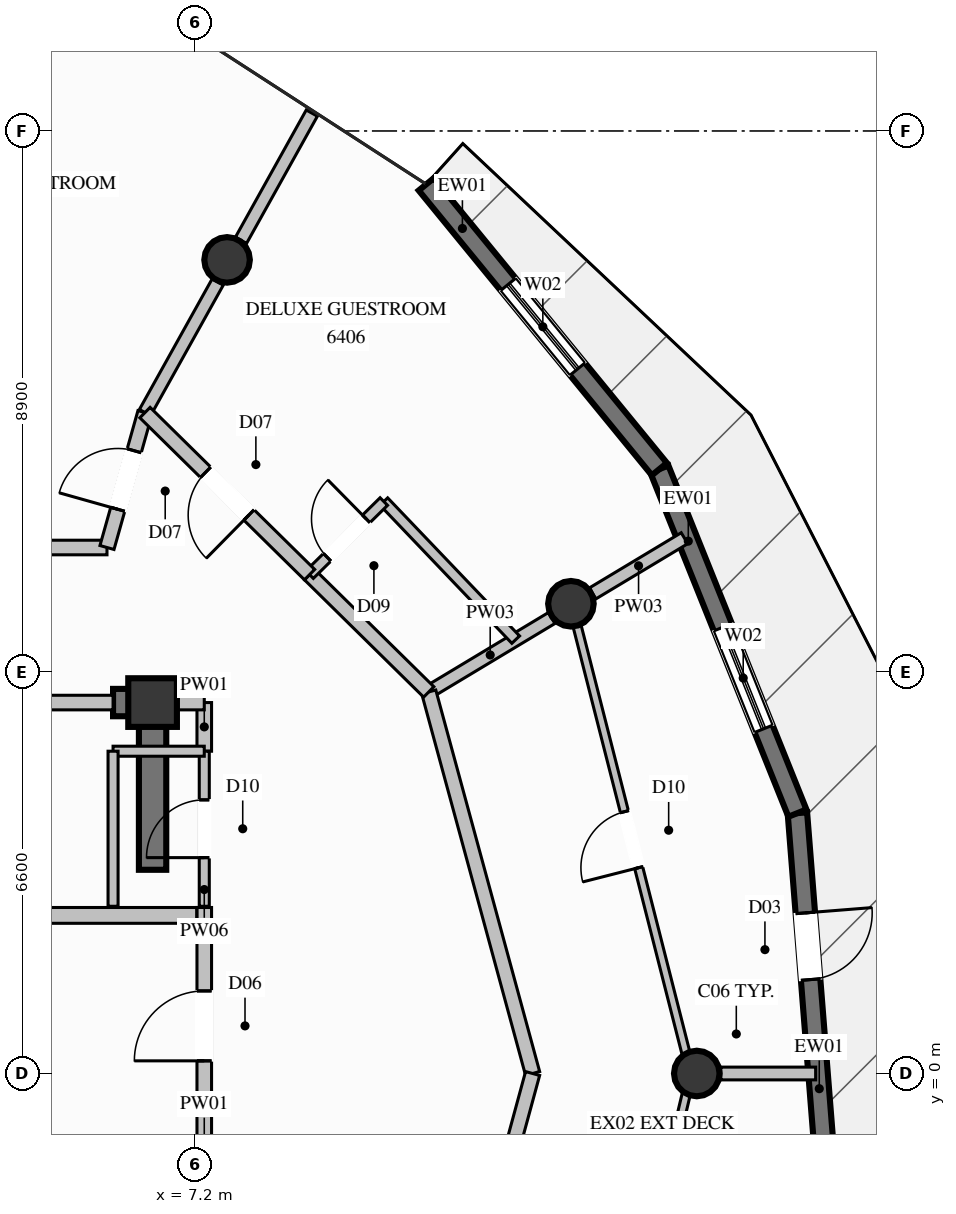
"""IFC4 building model, lengths in metres.
Left out: names, types, materials, properties, quantities, classifications, styles, units other than length and angle.
Written with IfcOpenShell. Run it as: python <this file> out.ifc"""

import sys

from ifc_helpers import new_model, si_unit, direction, frame, frame_2d, origin, origin_2d, place, context, subcontext, project, spatial, rectangle, circle, extrude, element, fill, save


model = new_model("IFC4")
c1 = context("Model", 3, precision=1e-05, world=origin(), true_north=direction((0.0, 1.0)))
c2 = subcontext(c1, "Body", "Model", "MODEL_VIEW")
j1 = project(units=[si_unit("LENGTHUNIT", "METRE"), si_unit("PLANEANGLEUNIT", "RADIAN")], contexts=[c1])
p1 = place(None, origin())
s1 = spatial("IfcSite", under=j1, at=p1, CompositionType="ELEMENT")
p2 = place(p1, origin())
s2 = spatial("IfcBuilding", under=s1, at=p2, CompositionType="ELEMENT")
p3 = place(p2, frame((0.0, 0.0, 239.2)))
s3 = spatial("IfcBuildingStorey", under=s2, at=p3, CompositionType="ELEMENT", Elevation=239.2)
p4 = place(p3, frame((6.5, 6.1, 0.0), z_axis=(0.0, 0.0, 1.0), x_axis=(1.0, 0.0, 0.0)))
e1 = element("IfcColumn", 1, at=p4, inside=s3, PredefinedType="COLUMN", context=c2, shape_type="SweptSolid", body=[
    extrude(rectangle(XDim=0.8, YDim=0.8, at=origin_2d()), origin(), (0.0, 0.0, 1.0), 3.8),
])
p5 = place(p3, frame((5.85, 6.1, 0.0), z_axis=(0.0, 0.0, 1.0), x_axis=(1.0, 0.0, 0.0)))
e2 = element("IfcWall", 2, at=p5, inside=s3, PredefinedType="SHEAR", context=c2, shape_type="SweptSolid", body=[
    extrude(rectangle(XDim=0.425, YDim=0.45, at=frame_2d((0.212, 0.0))), origin(), (0.0, 0.0, 1.0), 3.8),
])
p6 = place(p3, frame((6.5, 3.35, 0.0), z_axis=(0.0, 0.0, 1.0), x_axis=(0.0, 1.0, 0.0)))
e3 = element("IfcWall", 3, at=p6, inside=s3, PredefinedType="SHEAR", context=c2, shape_type="SweptSolid", body=[
    extrude(rectangle(XDim=2.975, YDim=0.45, at=frame_2d((1.487, 0.0))), origin(), (0.0, 0.0, 1.0), 3.8),
])
for number, where, z_axis, x_axis in (
    (4, (15.45, 0.0, 0.0), (0.0, 0.0, 1.0), (1.0, 0.0, 0.0)),
    (5, (13.38, 7.725, 0.0), (0.0, 0.0, 1.0), (1.0, 0.0, 0.0)),
    (6, (7.725, 13.38, 0.0), (0.0, 0.0, 1.0), (1.0, 0.0, 0.0)),
):
    element("IfcColumn", number, at=place(p3, frame(where, z_axis=z_axis, x_axis=x_axis)), inside=s3, PredefinedType="COLUMN", context=c2, shape_type="SweptSolid", body=[
        extrude(circle(Radius=0.375, at=origin_2d()), origin(), (0.0, 0.0, 1.0), 3.8),
    ])
p7 = place(p3, frame((17.105, 4.282, 0.0), z_axis=(0.0, 0.0, 1.0), x_axis=(0.079057550351, -0.996870053584, 0.0)))
e7 = element("IfcWall", 7, at=p7, inside=s3, PredefinedType="SOLIDWALL", context=c2, shape_type="SweptSolid", body=[
    extrude(rectangle(XDim=6.096, YDim=0.32, at=frame_2d((3.048, 0.0))), origin(), (0.0, 0.0, 1.0), 3.57),
])
p8 = place(p7, frame((1.646, 0.0, 0.0)))
e8 = element("IfcOpeningElement", 8, at=p8, cuts=e7, PredefinedType="OPENING", context=c2, shape_type="SweptSolid", body=[
    extrude(rectangle(XDim=1.1, YDim=2.2, at=frame_2d((0.55, 1.1))), frame((0.0, 0.17, 0.0), z_axis=(0.0, -1.0, 0.0), x_axis=(1.0, 0.0, 0.0)), (0.0, 0.0, 1.0), 0.34),
])
p9 = place(p3, frame((14.835, 9.939, 0.0), z_axis=(0.0, 0.0, 1.0), x_axis=(0.372412492589, -0.928067311871, 0.0)))
e9 = element("IfcWall", 9, at=p9, inside=s3, PredefinedType="SOLIDWALL", context=c2, shape_type="SweptSolid", body=[
    extrude(rectangle(XDim=6.095, YDim=0.32, at=frame_2d((3.048, 0.0))), origin(), (0.0, 0.0, 1.0), 3.57),
])
p10 = place(p9, frame((2.802, 0.0, 0.35)))
e10 = element("IfcOpeningElement", 10, at=p10, cuts=e9, PredefinedType="OPENING", context=c2, shape_type="SweptSolid", body=[
    extrude(rectangle(XDim=1.8, YDim=2.6, at=frame_2d((0.9, 1.3))), frame((0.0, 0.17, 0.0), z_axis=(0.0, -1.0, 0.0), x_axis=(1.0, 0.0, 0.0)), (0.0, 0.0, 1.0), 0.34),
])
p11 = place(p3, frame((11.001, 14.623, 0.0), z_axis=(0.0, 0.0, 1.0), x_axis=(0.633391522875, -0.773831492478, 0.0)))
e11 = element("IfcWall", 11, at=p11, inside=s3, PredefinedType="SOLIDWALL", context=c2, shape_type="SweptSolid", body=[
    extrude(rectangle(XDim=6.053, YDim=0.32, at=frame_2d((3.027, 0.0))), origin(), (0.0, 0.0, 1.0), 3.57),
])
p12 = place(p11, frame((2.127, 0.0, 0.35)))
e12 = element("IfcOpeningElement", 12, at=p12, cuts=e11, PredefinedType="OPENING", context=c2, shape_type="SweptSolid", body=[
    extrude(rectangle(XDim=1.8, YDim=2.6, at=frame_2d((0.9, 1.3))), frame((0.0, 0.17, 0.0), z_axis=(0.0, -1.0, 0.0), x_axis=(1.0, 0.0, 0.0)), (0.0, 0.0, 1.0), 0.34),
])
p13 = place(p3, frame((7.35, -2.34, 0.0), z_axis=(0.0, 0.0, 1.0), x_axis=(0.0, 1.0, 0.0)))
e13 = element("IfcWall", 13, at=p13, inside=s3, PredefinedType="PARTITIONING", context=c2, shape_type="SweptSolid", body=[
    extrude(rectangle(XDim=5.07, YDim=0.24, at=frame_2d((2.535, 0.0))), origin(), (0.0, 0.0, 1.0), 2.655),
])
p14 = place(p13, frame((2.548, 0.0, 0.0)))
e14 = element("IfcOpeningElement", 14, at=p14, cuts=e13, PredefinedType="OPENING", context=c2, shape_type="SweptSolid", body=[
    extrude(rectangle(XDim=1.15, YDim=2.2, at=frame_2d((0.575, 1.1))), frame((0.0, 0.13, 0.0), z_axis=(0.0, -1.0, 0.0), x_axis=(1.0, 0.0, 0.0)), (0.0, 0.0, 1.0), 0.26),
])
p15 = place(p3, frame((4.13, 2.6, 0.0), z_axis=(0.0, 0.0, 1.0), x_axis=(1.0, 0.0, 0.0)))
e15 = element("IfcWall", 15, at=p15, inside=s3, PredefinedType="PARTITIONING", context=c2, shape_type="SweptSolid", body=[
    extrude(rectangle(XDim=3.095, YDim=0.26, at=frame_2d((1.548, 0.0))), origin(), (0.0, 0.0, 1.0), 3.57),
])
p16 = place(p3, frame((-5.75, 8.65, 0.0), z_axis=(0.0, 0.0, 1.0), x_axis=(1.0, 0.0, 0.0)))
e16 = element("IfcWall", 16, at=p16, inside=s3, PredefinedType="PARTITIONING", context=c2, shape_type="SweptSolid", body=[
    extrude(rectangle(XDim=11.5, YDim=0.24, at=frame_2d((5.75, 0.0))), origin(), (0.0, 0.0, 1.0), 3.57),
])
p17 = place(p3, frame((3.0, 6.1, 0.0), z_axis=(0.0, 0.0, 1.0), x_axis=(1.0, 0.0, 0.0)))
e17 = element("IfcWall", 17, at=p17, inside=s3, PredefinedType="PARTITIONING", context=c2, shape_type="SweptSolid", body=[
    extrude(rectangle(XDim=2.85, YDim=0.24, at=frame_2d((1.425, 0.0))), origin(), (0.0, 0.0, 1.0), 2.655),
])
p18 = place(p3, frame((7.35, 5.3, 0.0), z_axis=(0.0, 0.0, 1.0), x_axis=(0.0, 1.0, 0.0)))
e18 = element("IfcWall", 18, at=p18, inside=s3, PredefinedType="PARTITIONING", context=c2, shape_type="SweptSolid", body=[
    extrude(rectangle(XDim=0.8, YDim=0.24, at=frame_2d((0.4, 0.0))), origin(), (0.0, 0.0, 1.0), 2.655),
])
p19 = place(p3, frame((6.5, 6.1, 0.0), z_axis=(0.0, 0.0, 1.0), x_axis=(1.0, 0.0, 0.0)))
e19 = element("IfcWall", 19, at=p19, inside=s3, PredefinedType="PARTITIONING", context=c2, shape_type="SweptSolid", body=[
    extrude(rectangle(XDim=0.85, YDim=0.24, at=frame_2d((0.425, 0.0))), origin(), (0.0, 0.0, 1.0), 3.011),
])
p20 = place(p3, frame((7.35, 2.75, 0.0), z_axis=(0.0, 0.0, 1.0), x_axis=(0.0, 1.0, 0.0)))
e20 = element("IfcWall", 20, at=p20, inside=s3, PredefinedType="PARTITIONING", context=c2, shape_type="SweptSolid", body=[
    extrude(rectangle(XDim=2.55, YDim=0.165, at=frame_2d((1.275, 0.0))), origin(), (0.0, 0.0, 1.0), 3.57),
])
p21 = place(p20, frame((0.8, 0.0, 0.0)))
e21 = element("IfcOpeningElement", 21, at=p21, cuts=e20, PredefinedType="OPENING", context=c2, shape_type="SweptSolid", body=[
    extrude(rectangle(XDim=0.95, YDim=2.1, at=frame_2d((0.475, 1.05))), frame((0.0, 0.093, 0.0), z_axis=(0.0, -1.0, 0.0), x_axis=(1.0, 0.0, 0.0)), (0.0, 0.0, 1.0), 0.185),
])
p22 = place(p3, frame((7.35, 5.3, 0.0), z_axis=(0.0, 0.0, 1.0), x_axis=(-1.0, 0.0, 0.0)))
e22 = element("IfcWall", 22, at=p22, inside=s3, PredefinedType="PARTITIONING", context=c2, shape_type="SweptSolid", body=[
    extrude(rectangle(XDim=1.5, YDim=0.165, at=frame_2d((0.75, 0.0))), origin(), (0.0, 0.0, 1.0), 2.655),
])
p23 = place(p3, frame((5.85, 5.3, 0.0), z_axis=(0.0, 0.0, 1.0), x_axis=(0.0, -1.0, 0.0)))
e23 = element("IfcWall", 23, at=p23, inside=s3, PredefinedType="PARTITIONING", context=c2, shape_type="SweptSolid", body=[
    extrude(rectangle(XDim=2.55, YDim=0.165, at=frame_2d((1.275, 0.0))), origin(), (0.0, 0.0, 1.0), 2.655),
])
p24 = place(p3, frame((11.042, 6.275, 0.0), z_axis=(0.0, 0.0, 1.0), x_axis=(0.857026686246, 0.515272024335, 0.0)))
e24 = element("IfcWall", 24, at=p24, inside=s3, PredefinedType="PARTITIONING", context=c2, shape_type="SweptSolid", body=[
    extrude(rectangle(XDim=2.358, YDim=0.21, at=frame_2d((1.179, 0.0))), origin(), (0.0, 0.0, 1.0), 3.011),
])
p25 = place(p3, frame((13.737, 7.895, 0.0), z_axis=(0.0, 0.0, 1.0), x_axis=(0.857150569961, 0.515065918514, 0.0)))
e25 = element("IfcWall", 25, at=p25, inside=s3, PredefinedType="PARTITIONING", context=c2, shape_type="SweptSolid", body=[
    extrude(rectangle(XDim=1.763, YDim=0.21, at=frame_2d((0.881, 0.0))), origin(), (0.0, 0.0, 1.0), 3.57),
])
p26 = place(p3, frame((6.375, 10.869, 0.0), z_axis=(0.0, 0.0, 1.0), x_axis=(0.486620940413, 0.873613221255, 0.0)))
e26 = element("IfcWall", 26, at=p26, inside=s3, PredefinedType="PARTITIONING", context=c2, shape_type="SweptSolid", body=[
    extrude(rectangle(XDim=2.458, YDim=0.21, at=frame_2d((1.229, 0.0))), origin(), (0.0, 0.0, 1.0), 3.011),
])
p27 = place(p3, frame((7.954, 13.702, 0.0), z_axis=(0.0, 0.0, 1.0), x_axis=(0.486456485885, 0.873704805607, 0.0)))
e27 = element("IfcWall", 27, at=p27, inside=s3, PredefinedType="PARTITIONING", context=c2, shape_type="SweptSolid", body=[
    extrude(rectangle(XDim=2.395, YDim=0.21, at=frame_2d((1.197, 0.0))), origin(), (0.0, 0.0, 1.0), 3.57),
])
p28 = place(p3, frame((5.75, 8.65, 0.0), z_axis=(0.0, 0.0, 1.0), x_axis=(0.271110513922, 0.962548226969, 0.0)))
e28 = element("IfcWall", 28, at=p28, inside=s3, PredefinedType="PARTITIONING", context=c2, shape_type="SweptSolid", body=[
    extrude(rectangle(XDim=2.305, YDim=0.24, at=frame_2d((1.153, 0.0))), origin(), (0.0, 0.0, 1.0), 3.57),
])
p29 = place(p28, frame((0.653, 0.0, 0.0)))
e29 = element("IfcOpeningElement", 29, at=p29, cuts=e28, PredefinedType="OPENING", context=c2, shape_type="SweptSolid", body=[
    extrude(rectangle(XDim=1.0, YDim=2.2, at=frame_2d((0.5, 1.1))), frame((0.0, 0.13, 0.0), z_axis=(0.0, -1.0, 0.0), x_axis=(1.0, 0.0, 0.0)), (0.0, 0.0, 1.0), 0.26),
])
p30 = place(p3, frame((15.845, 0.0, 0.0), z_axis=(0.0, 0.0, 1.0), x_axis=(1.0, 0.0, 0.0)))
e30 = element("IfcWall", 30, at=p30, inside=s3, PredefinedType="PARTITIONING", context=c2, shape_type="SweptSolid", body=[
    extrude(rectangle(XDim=1.56, YDim=0.21, at=frame_2d((0.78, 0.0))), origin(), (0.0, 0.0, 1.0), 3.57),
])
p31 = place(p3, frame((12.75, 0.0, 0.0), z_axis=(0.0, 0.0, 1.0), x_axis=(-0.262640884433, 0.964893655189, 0.0)))
e31 = element("IfcWall", 31, at=p31, inside=s3, PredefinedType="PARTITIONING", context=c2, shape_type="SweptSolid", body=[
    extrude(rectangle(XDim=6.503, YDim=0.24, at=frame_2d((3.251, 0.0))), origin(), (0.0, 0.0, 1.0), 3.57),
])
p32 = place(p3, frame((11.759, -3.64, 0.0), z_axis=(0.0, 0.0, 1.0), x_axis=(0.2626902414, 0.964880219029, 0.0)))
e32 = element("IfcWall", 32, at=p32, inside=s3, PredefinedType="PARTITIONING", context=c2, shape_type="SweptSolid", body=[
    extrude(rectangle(XDim=3.772, YDim=0.24, at=frame_2d((1.886, 0.0))), origin(), (0.0, 0.0, 1.0), 3.57),
])
p33 = place(p32, frame((1.336, 0.0, 0.0)))
e33 = element("IfcOpeningElement", 33, at=p33, cuts=e32, PredefinedType="OPENING", context=c2, shape_type="SweptSolid", body=[
    extrude(rectangle(XDim=1.1, YDim=2.3, at=frame_2d((0.55, 1.15))), frame((0.0, 0.13, 0.0), z_axis=(0.0, -1.0, 0.0), x_axis=(1.0, 0.0, 0.0)), (0.0, 0.0, 1.0), 0.26),
])
p34 = place(p3, frame((13.516, -7.759, 0.0), z_axis=(0.0, 0.0, 1.0), x_axis=(0.230840940032, 0.972991500685, 0.0)))
e34 = element("IfcWall", 34, at=p34, inside=s3, PredefinedType="PARTITIONING", context=c2, shape_type="SweptSolid", body=[
    extrude(rectangle(XDim=7.974, YDim=0.135, at=frame_2d((3.987, 0.0))), origin(), (0.0, 0.0, 1.0), 3.139),
])
p35 = place(p34, frame((3.512, 0.0, 0.0)))
e35 = element("IfcOpeningElement", 35, at=p35, cuts=e34, PredefinedType="OPENING", context=c2, shape_type="SweptSolid", body=[
    extrude(rectangle(XDim=0.95, YDim=2.1, at=frame_2d((0.475, 1.05))), frame((0.0, 0.078, 0.0), z_axis=(0.0, -1.0, 0.0), x_axis=(1.0, 0.0, 0.0)), (0.0, 0.0, 1.0), 0.155),
])
p36 = place(p3, frame((15.357, 0.0, 0.0), z_axis=(0.0, 0.0, 1.0), x_axis=(-0.246948201866, 0.969028681513, 0.0)))
e36 = element("IfcWall", 36, at=p36, inside=s3, PredefinedType="PARTITIONING", context=c2, shape_type="SweptSolid", body=[
    extrude(rectangle(XDim=7.937, YDim=0.135, at=frame_2d((3.968, 0.0))), origin(), (0.0, 0.0, 1.0), 3.139),
])
p37 = place(p36, frame((3.493, 0.0, 0.0)))
e37 = element("IfcOpeningElement", 37, at=p37, cuts=e36, PredefinedType="OPENING", context=c2, shape_type="SweptSolid", body=[
    extrude(rectangle(XDim=0.95, YDim=2.1, at=frame_2d((0.475, 1.05))), frame((0.0, 0.078, 0.0), z_axis=(0.0, -1.0, 0.0), x_axis=(1.0, 0.0, 0.0)), (0.0, 0.0, 1.0), 0.155),
])
p38 = place(p3, frame((11.042, 6.275, 0.0), z_axis=(0.0, 0.0, 1.0), x_axis=(-0.712677423321, 0.701491903224, 0.0)))
e38 = element("IfcWall", 38, at=p38, inside=s3, PredefinedType="PARTITIONING", context=c2, shape_type="SweptSolid", body=[
    extrude(rectangle(XDim=2.75, YDim=0.24, at=frame_2d((1.375, 0.0))), origin(), (0.0, 0.0, 1.0), 3.57),
])
p39 = place(p3, frame((12.472, 7.135, 0.0), z_axis=(0.0, 0.0, 1.0), x_axis=(-0.690671718567, 0.723168429324, 0.0)))
e39 = element("IfcWall", 39, at=p39, inside=s3, PredefinedType="PLUMBINGWALL", context=c2, shape_type="SweptSolid", body=[
    extrude(rectangle(XDim=3.14, YDim=0.175, at=frame_2d((1.57, 0.0))), origin(), (0.0, 0.0, 1.0), 3.57),
])
p40 = place(p3, frame((9.082, 8.204, 0.0), z_axis=(0.0, 0.0, 1.0), x_axis=(0.712642440828, 0.701527441751, 0.0)))
e40 = element("IfcWall", 40, at=p40, inside=s3, PredefinedType="PLUMBINGWALL", context=c2, shape_type="SweptSolid", body=[
    extrude(rectangle(XDim=1.713, YDim=0.175, at=frame_2d((0.857, 0.0))), origin(), (0.0, 0.0, 1.0), 3.57),
])
p41 = place(p40, frame((0.407, 0.0, 0.0)))
e41 = element("IfcOpeningElement", 41, at=p41, cuts=e40, PredefinedType="OPENING", context=c2, shape_type="SweptSolid", body=[
    extrude(rectangle(XDim=0.9, YDim=2.1, at=frame_2d((0.45, 1.05))), frame((0.0, 0.098, 0.0), z_axis=(0.0, -1.0, 0.0), x_axis=(1.0, 0.0, 0.0)), (0.0, 0.0, 1.0), 0.195),
])
p42 = place(p3, frame((9.082, 8.204, 0.0), z_axis=(0.0, 0.0, 1.0), x_axis=(-0.712644426178, 0.70152542494, 0.0)))
e42 = element("IfcWall", 42, at=p42, inside=s3, PredefinedType="PARTITIONING", context=c2, shape_type="SweptSolid", body=[
    extrude(rectangle(XDim=3.799, YDim=0.24, at=frame_2d((1.899, 0.0))), origin(), (0.0, 0.0, 1.0), 3.57),
])
p43 = place(p42, frame((1.399, 0.0, 0.0)))
e43 = element("IfcOpeningElement", 43, at=p43, cuts=e42, PredefinedType="OPENING", context=c2, shape_type="SweptSolid", body=[
    extrude(rectangle(XDim=1.0, YDim=2.2, at=frame_2d((0.5, 1.1))), frame((0.0, 0.13, 0.0), z_axis=(0.0, -1.0, 0.0), x_axis=(1.0, 0.0, 0.0)), (0.0, 0.0, 1.0), 0.26),
])
p44 = place(p8, origin())
e44 = element("IfcDoor", 44, at=p44, inside=s3, OperationType="SINGLE_SWING_LEFT", PredefinedType="DOOR", context=c2, shape_type="SweptSolid", body=[
    extrude(rectangle(XDim=1.1, YDim=2.2, at=frame_2d((0.55, 1.1))), frame((0.0, 0.025, 0.0), z_axis=(0.0, -1.0, 0.0), x_axis=(1.0, 0.0, 0.0)), (0.0, 0.0, 1.0), 0.05),
])
fill(e8, e44)
p45 = place(p10, origin())
e45 = element("IfcWindow", 45, at=p45, inside=s3, PartitioningType="SINGLE_PANEL", PredefinedType="WINDOW", context=c2, shape_type="SweptSolid", body=[
    extrude(rectangle(XDim=1.8, YDim=2.6, at=frame_2d((0.9, 1.3))), frame((0.0, 0.03, 0.0), z_axis=(0.0, -1.0, 0.0), x_axis=(1.0, 0.0, 0.0)), (0.0, 0.0, 1.0), 0.06),
])
fill(e10, e45)
p46 = place(p12, origin())
e46 = element("IfcWindow", 46, at=p46, inside=s3, PartitioningType="SINGLE_PANEL", PredefinedType="WINDOW", context=c2, shape_type="SweptSolid", body=[
    extrude(rectangle(XDim=1.8, YDim=2.6, at=frame_2d((0.9, 1.3))), frame((0.0, 0.03, 0.0), z_axis=(0.0, -1.0, 0.0), x_axis=(1.0, 0.0, 0.0)), (0.0, 0.0, 1.0), 0.06),
])
fill(e12, e46)
p47 = place(p14, origin())
e47 = element("IfcDoor", 47, at=p47, inside=s3, OperationType="SINGLE_SWING_LEFT", PredefinedType="DOOR", context=c2, shape_type="SweptSolid", body=[
    extrude(rectangle(XDim=1.15, YDim=2.2, at=frame_2d((0.575, 1.1))), frame((0.0, 0.025, 0.0), z_axis=(0.0, -1.0, 0.0), x_axis=(1.0, 0.0, 0.0)), (0.0, 0.0, 1.0), 0.05),
])
fill(e14, e47)
p48 = place(p21, origin())
e48 = element("IfcDoor", 48, at=p48, inside=s3, OperationType="SINGLE_SWING_LEFT", PredefinedType="DOOR", context=c2, shape_type="SweptSolid", body=[
    extrude(rectangle(XDim=0.95, YDim=2.1, at=frame_2d((0.475, 1.05))), frame((0.0, 0.025, 0.0), z_axis=(0.0, -1.0, 0.0), x_axis=(1.0, 0.0, 0.0)), (0.0, 0.0, 1.0), 0.05),
])
fill(e21, e48)
p49 = place(p29, origin())
e49 = element("IfcDoor", 49, at=p49, inside=s3, OperationType="SINGLE_SWING_LEFT", PredefinedType="DOOR", context=c2, shape_type="SweptSolid", body=[
    extrude(rectangle(XDim=1.0, YDim=2.2, at=frame_2d((0.5, 1.1))), frame((0.0, 0.025, 0.0), z_axis=(0.0, -1.0, 0.0), x_axis=(1.0, 0.0, 0.0)), (0.0, 0.0, 1.0), 0.05),
])
fill(e29, e49)
p50 = place(p37, origin())
e50 = element("IfcDoor", 50, at=p50, inside=s3, OperationType="SINGLE_SWING_LEFT", PredefinedType="DOOR", context=c2, shape_type="SweptSolid", body=[
    extrude(rectangle(XDim=0.95, YDim=2.1, at=frame_2d((0.475, 1.05))), frame((0.0, 0.025, 0.0), z_axis=(0.0, -1.0, 0.0), x_axis=(1.0, 0.0, 0.0)), (0.0, 0.0, 1.0), 0.05),
])
fill(e37, e50)
p51 = place(p41, origin())
e51 = element("IfcDoor", 51, at=p51, inside=s3, OperationType="SINGLE_SWING_RIGHT", PredefinedType="DOOR", context=c2, shape_type="SweptSolid", body=[
    extrude(rectangle(XDim=0.9, YDim=2.1, at=frame_2d((0.45, 1.05))), frame((0.0, 0.025, 0.0), z_axis=(0.0, -1.0, 0.0), x_axis=(1.0, 0.0, 0.0)), (0.0, 0.0, 1.0), 0.05),
])
fill(e41, e51)
p52 = place(p43, origin())
e52 = element("IfcDoor", 52, at=p52, inside=s3, OperationType="SINGLE_SWING_LEFT", PredefinedType="DOOR", context=c2, shape_type="SweptSolid", body=[
    extrude(rectangle(XDim=1.0, YDim=2.2, at=frame_2d((0.5, 1.1))), frame((0.0, 0.025, 0.0), z_axis=(0.0, -1.0, 0.0), x_axis=(1.0, 0.0, 0.0)), (0.0, 0.0, 1.0), 0.05),
])
fill(e43, e52)
save(model, sys.argv[1])
